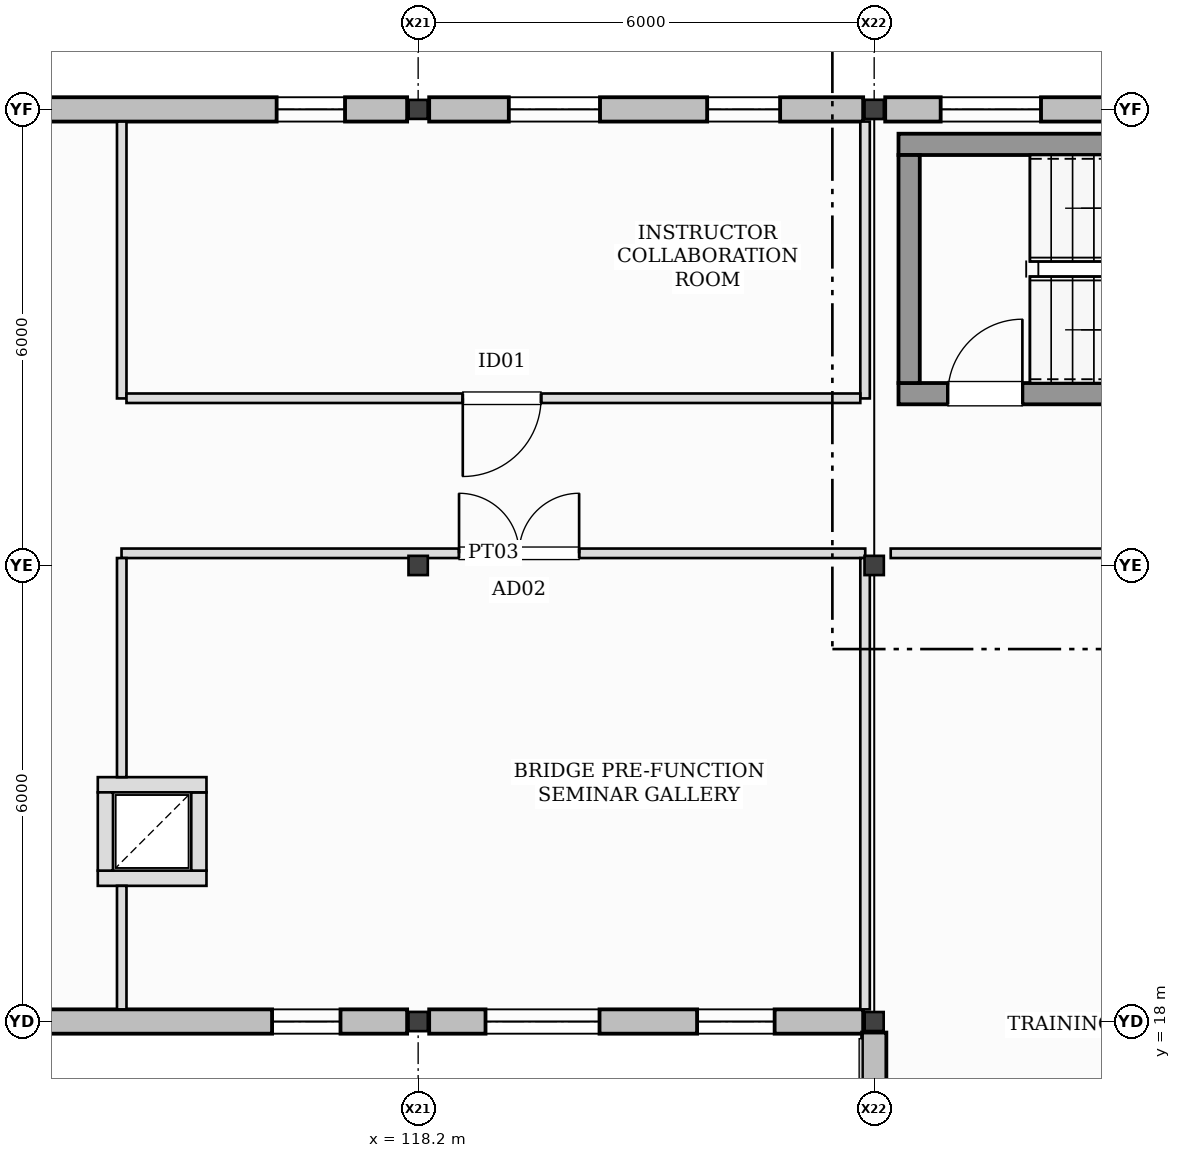
"""IFC4 building model, lengths in metres.
Left out: names, types, materials, properties, quantities, classifications, styles, units other than length and angle.
Written with IfcOpenShell. Run it as: python <this file> out.ifc"""

import sys

from ifc_helpers import new_model, si_unit, direction, frame, frame_2d, origin, origin_2d, place, context, subcontext, project, spatial, rectangle, hollow_rectangle, i_section, extrude, element, fill, save


model = new_model("IFC4")
c1 = context("Model", 3, precision=1e-05, world=origin(), true_north=direction((0.0, 1.0)))
c2 = subcontext(c1, "Body", "Model", "MODEL_VIEW")
j1 = project(units=[si_unit("LENGTHUNIT", "METRE"), si_unit("PLANEANGLEUNIT", "RADIAN")], contexts=[c1])
p1 = place(None, origin())
s1 = spatial("IfcSite", under=j1, at=p1, CompositionType="ELEMENT")
p2 = place(p1, origin())
s2 = spatial("IfcBuilding", under=s1, at=p2, CompositionType="ELEMENT")
p3 = place(p2, frame((0.0, 0.0, 6.0)))
s3 = spatial("IfcBuildingStorey", under=s2, at=p3, CompositionType="ELEMENT", Elevation=6.0)
for number, where, z_axis, x_axis in (
    (1, (118.2, 18.0, 0.0), (0.0, 0.0, 1.0), (1.0, 0.0, 0.0)),
    (2, (118.2, 24.0, 0.0), (0.0, 0.0, 1.0), (1.0, 0.0, 0.0)),
):
    element("IfcColumn", number, at=place(p3, frame(where, z_axis=z_axis, x_axis=x_axis)), inside=s3, PredefinedType="COLUMN", context=c2, shape_type="SweptSolid", body=[
        extrude(i_section(OverallWidth=0.254, OverallDepth=0.253, WebThickness=0.009, FlangeThickness=0.014, at=origin_2d()), origin(), (0.0, 0.0, 1.0), 4.0),
    ])
for number, where, z_axis, x_axis in (
    (3, (118.2, 30.0, 0.0), (0.0, 0.0, 1.0), (1.0, 0.0, 0.0)),
    (4, (124.2, 18.0, 0.0), (0.0, 0.0, 1.0), (1.0, 0.0, 0.0)),
):
    element("IfcColumn", number, at=place(p3, frame(where, z_axis=z_axis, x_axis=x_axis)), inside=s3, PredefinedType="COLUMN", context=c2, shape_type="SweptSolid", body=[
        extrude(hollow_rectangle(XDim=0.25, YDim=0.25, WallThickness=0.012, at=origin_2d()), origin(), (0.0, 0.0, 1.0), 4.0),
    ])
for number, where, z_axis, x_axis in (
    (5, (124.2, 24.0, 0.0), (0.0, 0.0, 1.0), (1.0, 0.0, 0.0)),
    (6, (124.2, 30.0, 0.0), (0.0, 0.0, 1.0), (1.0, 0.0, 0.0)),
):
    element("IfcColumn", number, at=place(p3, frame(where, z_axis=z_axis, x_axis=x_axis)), inside=s3, PredefinedType="COLUMN", context=c2, shape_type="SweptSolid", body=[
        extrude(i_section(OverallWidth=0.254, OverallDepth=0.253, WebThickness=0.009, FlangeThickness=0.014, at=origin_2d()), origin(), (0.0, 0.0, 1.0), 4.0),
    ])
p4 = place(p3, frame((112.345, 18.0, 0.0), z_axis=(0.0, 0.0, 1.0), x_axis=(1.0, 0.0, 0.0)))
e7 = element("IfcWall", 7, at=p4, inside=s3, PredefinedType="STANDARD", context=c2, shape_type="SweptSolid", body=[
    extrude(rectangle(XDim=5.71, YDim=0.32, at=frame_2d((2.855, 0.0))), origin(), (0.0, 0.0, 1.0), 3.619),
])
p5 = place(p4, frame((3.933, 0.0, 0.86)))
e8 = element("IfcOpeningElement", 8, at=p5, cuts=e7, PredefinedType="OPENING", context=c2, shape_type="SweptSolid", body=[
    extrude(rectangle(XDim=0.9, YDim=0.9, at=frame_2d((0.45, 0.45))), frame((0.0, 0.17, 0.0), z_axis=(0.0, -1.0, 0.0), x_axis=(1.0, 0.0, 0.0)), (0.0, 0.0, 1.0), 0.34),
])
p6 = place(p3, frame((118.345, 18.0, 0.0), z_axis=(0.0, 0.0, 1.0), x_axis=(1.0, 0.0, 0.0)))
e9 = element("IfcWall", 9, at=p6, inside=s3, PredefinedType="STANDARD", context=c2, shape_type="SweptSolid", body=[
    extrude(rectangle(XDim=5.71, YDim=0.32, at=frame_2d((2.855, 0.0))), origin(), (0.0, 0.0, 1.0), 3.619),
])
p7 = place(p6, frame((0.741, 0.0, 1.28)))
e10 = element("IfcOpeningElement", 10, at=p7, cuts=e9, PredefinedType="OPENING", context=c2, shape_type="SweptSolid", body=[
    extrude(rectangle(XDim=1.5, YDim=1.5, at=frame_2d((0.75, 0.75))), frame((0.0, 0.17, 0.0), z_axis=(0.0, -1.0, 0.0), x_axis=(1.0, 0.0, 0.0)), (0.0, 0.0, 1.0), 0.34),
])
p8 = place(p6, frame((3.525, 0.0, 1.18)))
e11 = element("IfcOpeningElement", 11, at=p8, cuts=e9, PredefinedType="OPENING", context=c2, shape_type="SweptSolid", body=[
    extrude(rectangle(XDim=1.02, YDim=1.02, at=frame_2d((0.51, 0.51))), frame((0.0, 0.17, 0.0), z_axis=(0.0, -1.0, 0.0), x_axis=(1.0, 0.0, 0.0)), (0.0, 0.0, 1.0), 0.34),
])
p9 = place(p3, frame((118.055, 30.0, 0.0), z_axis=(0.0, 0.0, 1.0), x_axis=(-1.0, 0.0, 0.0)))
e12 = element("IfcWall", 12, at=p9, inside=s3, PredefinedType="STANDARD", context=c2, shape_type="SweptSolid", body=[
    extrude(rectangle(XDim=5.71, YDim=0.32, at=frame_2d((2.855, 0.0))), origin(), (0.0, 0.0, 1.0), 3.619),
])
p10 = place(p9, frame((0.817, 0.0, 0.86)))
e13 = element("IfcOpeningElement", 13, at=p10, cuts=e12, PredefinedType="OPENING", context=c2, shape_type="SweptSolid", body=[
    extrude(rectangle(XDim=0.9, YDim=0.9, at=frame_2d((0.45, 0.45))), frame((0.0, 0.17, 0.0), z_axis=(0.0, -1.0, 0.0), x_axis=(1.0, 0.0, 0.0)), (0.0, 0.0, 1.0), 0.34),
])
p11 = place(p3, frame((124.055, 30.0, 0.0), z_axis=(0.0, 0.0, 1.0), x_axis=(-1.0, 0.0, 0.0)))
e14 = element("IfcWall", 14, at=p11, inside=s3, PredefinedType="STANDARD", context=c2, shape_type="SweptSolid", body=[
    extrude(rectangle(XDim=5.71, YDim=0.32, at=frame_2d((2.855, 0.0))), origin(), (0.0, 0.0, 1.0), 3.619),
])
p12 = place(p11, frame((1.092, 0.0, 1.18)))
e15 = element("IfcOpeningElement", 15, at=p12, cuts=e14, PredefinedType="OPENING", context=c2, shape_type="SweptSolid", body=[
    extrude(rectangle(XDim=0.96, YDim=0.96, at=frame_2d((0.48, 0.48))), frame((0.0, 0.17, 0.0), z_axis=(0.0, -1.0, 0.0), x_axis=(1.0, 0.0, 0.0)), (0.0, 0.0, 1.0), 0.34),
])
p13 = place(p11, frame((3.462, 0.0, 0.96)))
e16 = element("IfcOpeningElement", 16, at=p13, cuts=e14, PredefinedType="OPENING", context=c2, shape_type="SweptSolid", body=[
    extrude(rectangle(XDim=1.2, YDim=1.2, at=frame_2d((0.6, 0.6))), frame((0.0, 0.17, 0.0), z_axis=(0.0, -1.0, 0.0), x_axis=(1.0, 0.0, 0.0)), (0.0, 0.0, 1.0), 0.34),
])
p14 = place(p3, frame((130.055, 30.0, 0.0), z_axis=(0.0, 0.0, 1.0), x_axis=(-1.0, 0.0, 0.0)))
e17 = element("IfcWall", 17, at=p14, inside=s3, PredefinedType="STANDARD", context=c2, shape_type="SweptSolid", body=[
    extrude(rectangle(XDim=5.71, YDim=0.32, at=frame_2d((2.855, 0.0))), origin(), (0.0, 0.0, 1.0), 3.153),
])
p15 = place(p14, frame((0.754, 0.0, 1.42)))
e18 = element("IfcOpeningElement", 18, at=p15, cuts=e17, PredefinedType="OPENING", context=c2, shape_type="SweptSolid", body=[
    extrude(rectangle(XDim=1.08, YDim=1.08, at=frame_2d((0.54, 0.54))), frame((0.0, 0.17, 0.0), z_axis=(0.0, -1.0, 0.0), x_axis=(1.0, 0.0, 0.0)), (0.0, 0.0, 1.0), 0.34),
])
p16 = place(p14, frame((3.66, 0.0, 1.28)))
e19 = element("IfcOpeningElement", 19, at=p16, cuts=e17, PredefinedType="OPENING", context=c2, shape_type="SweptSolid", body=[
    extrude(rectangle(XDim=1.32, YDim=1.32, at=frame_2d((0.66, 0.66))), frame((0.0, 0.17, 0.0), z_axis=(0.0, -1.0, 0.0), x_axis=(1.0, 0.0, 0.0)), (0.0, 0.0, 1.0), 0.34),
])
p17 = place(p3, frame((124.2, 17.855, 0.0), z_axis=(0.0, 0.0, 1.0), x_axis=(0.0, -1.0, 0.0)))
e20 = element("IfcWall", 20, at=p17, inside=s3, PredefinedType="STANDARD", context=c2, shape_type="SweptSolid", body=[
    extrude(rectangle(XDim=3.91, YDim=0.32, at=frame_2d((1.955, 0.0))), origin(), (0.0, 0.0, 1.0), 3.227),
])
p18 = place(p3, frame((124.52, 26.26, 0.0), z_axis=(0.0, 0.0, 1.0), x_axis=(1.0, 0.0, 0.0)))
e21 = element("IfcWall", 21, at=p18, inside=s3, PredefinedType="SHEAR", context=c2, shape_type="SweptSolid", body=[
    extrude(rectangle(XDim=8.16, YDim=0.28, at=frame_2d((4.08, 0.0))), origin(), (0.0, 0.0, 1.0), 4.0),
])
p19 = place(p18, frame((0.65, 0.0, 0.0)))
e22 = element("IfcOpeningElement", 22, at=p19, cuts=e21, PredefinedType="OPENING", context=c2, shape_type="SweptSolid", body=[
    extrude(rectangle(XDim=0.98, YDim=2.15, at=frame_2d((0.49, 1.075))), frame((0.0, 0.15, 0.0), z_axis=(0.0, -1.0, 0.0), x_axis=(1.0, 0.0, 0.0)), (0.0, 0.0, 1.0), 0.3),
])
p20 = place(p3, frame((132.68, 29.54, 0.0), z_axis=(0.0, 0.0, 1.0), x_axis=(-1.0, 0.0, 0.0)))
e23 = element("IfcWall", 23, at=p20, inside=s3, PredefinedType="SHEAR", context=c2, shape_type="SweptSolid", body=[
    extrude(rectangle(XDim=8.16, YDim=0.28, at=frame_2d((4.08, 0.0))), origin(), (0.0, 0.0, 1.0), 4.0),
])
p21 = place(p3, frame((124.66, 29.4, 0.0), z_axis=(0.0, 0.0, 1.0), x_axis=(0.0, -1.0, 0.0)))
e24 = element("IfcWall", 24, at=p21, inside=s3, PredefinedType="SHEAR", context=c2, shape_type="SweptSolid", body=[
    extrude(rectangle(XDim=3.0, YDim=0.28, at=frame_2d((1.5, 0.0))), origin(), (0.0, 0.0, 1.0), 4.0),
])
p22 = place(p3, frame((113.985, 19.885, 0.0), z_axis=(0.0, 0.0, 1.0), x_axis=(1.0, 0.0, 0.0)))
e25 = element("IfcWall", 25, at=p22, inside=s3, PredefinedType="PARTITIONING", context=c2, shape_type="SweptSolid", body=[
    extrude(rectangle(XDim=1.43, YDim=0.2, at=frame_2d((0.715, 0.0))), origin(), (0.0, 0.0, 1.0), 3.72),
])
p23 = place(p3, frame((115.315, 19.985, 0.0), z_axis=(0.0, 0.0, 1.0), x_axis=(0.0, 1.0, 0.0)))
e26 = element("IfcWall", 26, at=p23, inside=s3, PredefinedType="PARTITIONING", context=c2, shape_type="SweptSolid", body=[
    extrude(rectangle(XDim=1.03, YDim=0.2, at=frame_2d((0.515, 0.0))), origin(), (0.0, 0.0, 1.0), 3.72),
])
p24 = place(p3, frame((115.415, 21.115, 0.0), z_axis=(0.0, 0.0, 1.0), x_axis=(-1.0, 0.0, 0.0)))
e27 = element("IfcWall", 27, at=p24, inside=s3, PredefinedType="PARTITIONING", context=c2, shape_type="SweptSolid", body=[
    extrude(rectangle(XDim=1.43, YDim=0.2, at=frame_2d((0.715, 0.0))), origin(), (0.0, 0.0, 1.0), 3.72),
])
p25 = place(p3, frame((114.085, 21.015, 0.0), z_axis=(0.0, 0.0, 1.0), x_axis=(0.0, -1.0, 0.0)))
e28 = element("IfcWall", 28, at=p25, inside=s3, PredefinedType="PARTITIONING", context=c2, shape_type="SweptSolid", body=[
    extrude(rectangle(XDim=1.03, YDim=0.2, at=frame_2d((0.515, 0.0))), origin(), (0.0, 0.0, 1.0), 3.72),
])
p26 = place(p3, frame((114.298, 24.16, 0.0), z_axis=(0.0, 0.0, 1.0), x_axis=(1.0, 0.0, 0.0)))
e29 = element("IfcWall", 29, at=p26, inside=s3, PredefinedType="PARTITIONING", context=c2, shape_type="SweptSolid", body=[
    extrude(rectangle(XDim=9.785, YDim=0.125, at=frame_2d((4.893, 0.0))), origin(), (0.0, 0.0, 1.0), 3.72),
])
p27 = place(p26, frame((4.44, 0.0, 0.0)))
e30 = element("IfcOpeningElement", 30, at=p27, cuts=e29, PredefinedType="OPENING", context=c2, shape_type="SweptSolid", body=[
    extrude(rectangle(XDim=1.58, YDim=2.2, at=frame_2d((0.79, 1.1))), frame((0.0, 0.073, 0.0), z_axis=(0.0, -1.0, 0.0), x_axis=(1.0, 0.0, 0.0)), (0.0, 0.0, 1.0), 0.145),
])
p28 = place(p3, frame((124.08, 24.097, 0.0), z_axis=(0.0, 0.0, 1.0), x_axis=(0.0, -1.0, 0.0)))
e31 = element("IfcWall", 31, at=p28, inside=s3, PredefinedType="PARTITIONING", context=c2, shape_type="SweptSolid", body=[
    extrude(rectangle(XDim=5.938, YDim=0.125, at=frame_2d((2.969, 0.0))), origin(), (0.0, 0.0, 1.0), 3.72),
])
p29 = place(p3, frame((114.3, 18.16, 0.0), z_axis=(0.0, 0.0, 1.0), x_axis=(0.0, 1.0, 0.0)))
e32 = element("IfcWall", 32, at=p29, inside=s3, PredefinedType="PARTITIONING", context=c2, shape_type="SweptSolid", body=[
    extrude(rectangle(XDim=1.625, YDim=0.125, at=frame_2d((0.812, 0.0))), origin(), (0.0, 0.0, 1.0), 3.72),
])
p30 = place(p3, frame((114.3, 21.215, 0.0), z_axis=(0.0, 0.0, 1.0), x_axis=(0.0, 1.0, 0.0)))
e33 = element("IfcWall", 33, at=p30, inside=s3, PredefinedType="PARTITIONING", context=c2, shape_type="SweptSolid", body=[
    extrude(rectangle(XDim=2.882, YDim=0.125, at=frame_2d((1.441, 0.0))), origin(), (0.0, 0.0, 1.0), 3.72),
])
for number, where, z_axis, x_axis in (
    (34, (114.3, 26.198, 0.0), (0.0, 0.0, 1.0), (0.0, 1.0, 0.0)),
    (35, (124.08, 29.84, 0.0), (0.0, 0.0, 1.0), (0.0, -1.0, 0.0)),
):
    element("IfcWall", number, at=place(p3, frame(where, z_axis=z_axis, x_axis=x_axis)), inside=s3, PredefinedType="PARTITIONING", context=c2, shape_type="SweptSolid", body=[
        extrude(rectangle(XDim=3.643, YDim=0.125, at=frame_2d((1.821, 0.0))), origin(), (0.0, 0.0, 1.0), 3.72),
    ])
p31 = place(p3, frame((124.018, 26.2, 0.0), z_axis=(0.0, 0.0, 1.0), x_axis=(-1.0, 0.0, 0.0)))
e36 = element("IfcWall", 36, at=p31, inside=s3, PredefinedType="PARTITIONING", context=c2, shape_type="SweptSolid", body=[
    extrude(rectangle(XDim=9.655, YDim=0.125, at=frame_2d((4.828, 0.0))), origin(), (0.0, 0.0, 1.0), 3.72),
])
p32 = place(p31, frame((4.2, 0.0, 0.0)))
e37 = element("IfcOpeningElement", 37, at=p32, cuts=e36, PredefinedType="OPENING", context=c2, shape_type="SweptSolid", body=[
    extrude(rectangle(XDim=1.03, YDim=2.15, at=frame_2d((0.515, 1.075))), frame((0.0, 0.073, 0.0), z_axis=(0.0, -1.0, 0.0), x_axis=(1.0, 0.0, 0.0)), (0.0, 0.0, 1.0), 0.145),
])
p33 = place(p3, frame((124.417, 24.16, 0.0), z_axis=(0.0, 0.0, 1.0), x_axis=(1.0, 0.0, 0.0)))
e38 = element("IfcWall", 38, at=p33, inside=s3, PredefinedType="PARTITIONING", context=c2, shape_type="SweptSolid", body=[
    extrude(rectangle(XDim=6.865, YDim=0.125, at=frame_2d((3.433, 0.0))), origin(), (0.0, 0.0, 1.0), 3.153),
])
p34 = place(p33, frame((2.87, 0.0, 0.0)))
e39 = element("IfcOpeningElement", 39, at=p34, cuts=e38, PredefinedType="OPENING", context=c2, shape_type="SweptSolid", body=[
    extrude(rectangle(XDim=0.9, YDim=2.1, at=frame_2d((0.45, 1.05))), frame((0.0, 0.073, 0.0), z_axis=(0.0, -1.0, 0.0), x_axis=(1.0, 0.0, 0.0)), (0.0, 0.0, 1.0), 0.145),
])
p35 = place(p5, origin())
e40 = element("IfcWindow", 40, at=p35, inside=s3, PartitioningType="SINGLE_PANEL", PredefinedType="WINDOW", context=c2, shape_type="SweptSolid", body=[
    extrude(rectangle(XDim=0.9, YDim=0.9, at=frame_2d((0.45, 0.45))), frame((0.0, 0.03, 0.0), z_axis=(0.0, -1.0, 0.0), x_axis=(1.0, 0.0, 0.0)), (0.0, 0.0, 1.0), 0.06),
])
fill(e8, e40)
p36 = place(p7, origin())
e41 = element("IfcWindow", 41, at=p36, inside=s3, PartitioningType="SINGLE_PANEL", PredefinedType="WINDOW", context=c2, shape_type="SweptSolid", body=[
    extrude(rectangle(XDim=1.5, YDim=1.5, at=frame_2d((0.75, 0.75))), frame((0.0, 0.03, 0.0), z_axis=(0.0, -1.0, 0.0), x_axis=(1.0, 0.0, 0.0)), (0.0, 0.0, 1.0), 0.06),
])
fill(e10, e41)
p37 = place(p8, origin())
e42 = element("IfcWindow", 42, at=p37, inside=s3, PartitioningType="SINGLE_PANEL", PredefinedType="WINDOW", context=c2, shape_type="SweptSolid", body=[
    extrude(rectangle(XDim=1.02, YDim=1.02, at=frame_2d((0.51, 0.51))), frame((0.0, 0.03, 0.0), z_axis=(0.0, -1.0, 0.0), x_axis=(1.0, 0.0, 0.0)), (0.0, 0.0, 1.0), 0.06),
])
fill(e11, e42)
p38 = place(p10, origin())
e43 = element("IfcWindow", 43, at=p38, inside=s3, PartitioningType="SINGLE_PANEL", PredefinedType="WINDOW", context=c2, shape_type="SweptSolid", body=[
    extrude(rectangle(XDim=0.9, YDim=0.9, at=frame_2d((0.45, 0.45))), frame((0.0, 0.03, 0.0), z_axis=(0.0, -1.0, 0.0), x_axis=(1.0, 0.0, 0.0)), (0.0, 0.0, 1.0), 0.06),
])
fill(e13, e43)
p39 = place(p12, origin())
e44 = element("IfcWindow", 44, at=p39, inside=s3, PartitioningType="SINGLE_PANEL", PredefinedType="WINDOW", context=c2, shape_type="SweptSolid", body=[
    extrude(rectangle(XDim=0.96, YDim=0.96, at=frame_2d((0.48, 0.48))), frame((0.0, 0.03, 0.0), z_axis=(0.0, -1.0, 0.0), x_axis=(1.0, 0.0, 0.0)), (0.0, 0.0, 1.0), 0.06),
])
fill(e15, e44)
p40 = place(p13, origin())
e45 = element("IfcWindow", 45, at=p40, inside=s3, PartitioningType="SINGLE_PANEL", PredefinedType="WINDOW", context=c2, shape_type="SweptSolid", body=[
    extrude(rectangle(XDim=1.2, YDim=1.2, at=frame_2d((0.6, 0.6))), frame((0.0, 0.03, 0.0), z_axis=(0.0, -1.0, 0.0), x_axis=(1.0, 0.0, 0.0)), (0.0, 0.0, 1.0), 0.06),
])
fill(e16, e45)
p41 = place(p16, origin())
e46 = element("IfcWindow", 46, at=p41, inside=s3, PartitioningType="SINGLE_PANEL", PredefinedType="WINDOW", context=c2, shape_type="SweptSolid", body=[
    extrude(rectangle(XDim=1.32, YDim=1.32, at=frame_2d((0.66, 0.66))), frame((0.0, 0.03, 0.0), z_axis=(0.0, -1.0, 0.0), x_axis=(1.0, 0.0, 0.0)), (0.0, 0.0, 1.0), 0.06),
])
fill(e19, e46)
p42 = place(p19, origin())
e47 = element("IfcDoor", 47, at=p42, inside=s3, OperationType="SINGLE_SWING_RIGHT", PredefinedType="DOOR", context=c2, shape_type="SweptSolid", body=[
    extrude(rectangle(XDim=0.98, YDim=2.15, at=frame_2d((0.49, 1.075))), frame((0.0, 0.025, 0.0), z_axis=(0.0, -1.0, 0.0), x_axis=(1.0, 0.0, 0.0)), (0.0, 0.0, 1.0), 0.05),
])
fill(e22, e47)
p43 = place(p27, origin())
e48 = element("IfcDoor", 48, at=p43, inside=s3, OperationType="DOUBLE_DOOR_SINGLE_SWING", PredefinedType="DOOR", context=c2, shape_type="SweptSolid", body=[
    extrude(rectangle(XDim=1.58, YDim=2.2, at=frame_2d((0.79, 1.1))), frame((0.0, 0.025, 0.0), z_axis=(0.0, -1.0, 0.0), x_axis=(1.0, 0.0, 0.0)), (0.0, 0.0, 1.0), 0.05),
])
fill(e30, e48)
p44 = place(p32, frame((1.03, 0.0, 0.0), z_axis=(0.0, 0.0, 1.0), x_axis=(-1.0, 0.0, 0.0)))
e49 = element("IfcDoor", 49, at=p44, inside=s3, OperationType="SINGLE_SWING_RIGHT", PredefinedType="DOOR", context=c2, shape_type="SweptSolid", body=[
    extrude(rectangle(XDim=1.03, YDim=2.15, at=frame_2d((0.515, 1.075))), frame((0.0, 0.025, 0.0), z_axis=(0.0, -1.0, 0.0), x_axis=(1.0, 0.0, 0.0)), (0.0, 0.0, 1.0), 0.05),
])
fill(e37, e49)
save(model, sys.argv[1])
